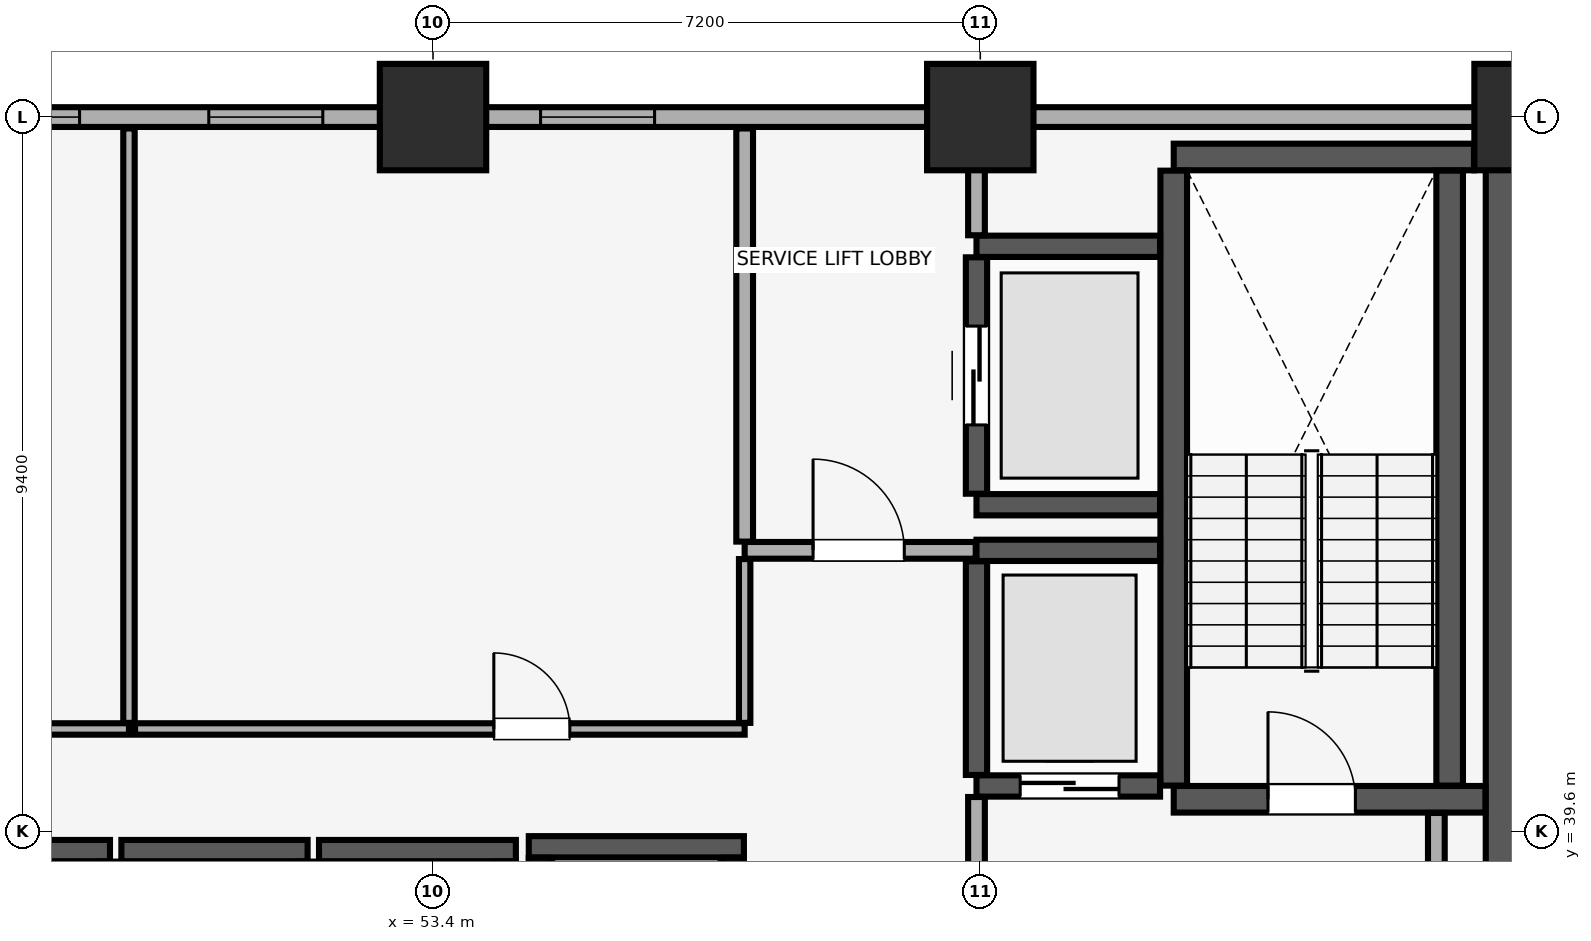
"""IFC4 building model, lengths in metres.
Left out: names, types, materials, properties, quantities, classifications, styles, units other than length and angle.
Written with IfcOpenShell. Run it as: python <this file> out.ifc"""

import sys

from ifc_helpers import new_model, si_unit, direction, frame, frame_2d, origin, origin_2d, place, context, subcontext, project, spatial, rectangle, extrude, element, fill, save


model = new_model("IFC4")
c1 = context("Model", 3, precision=1e-05, world=origin(), true_north=direction((0.0, 1.0)))
c2 = subcontext(c1, "Body", "Model", "MODEL_VIEW")
j1 = project(units=[si_unit("LENGTHUNIT", "METRE"), si_unit("PLANEANGLEUNIT", "RADIAN")], contexts=[c1])
p1 = place(None, origin())
s1 = spatial("IfcSite", under=j1, at=p1, CompositionType="ELEMENT")
p2 = place(p1, origin())
s2 = spatial("IfcBuilding", under=s1, at=p2, CompositionType="ELEMENT")
p3 = place(p2, frame((0.0, 0.0, 57.65)))
s3 = spatial("IfcBuildingStorey", under=s2, at=p3, CompositionType="ELEMENT", Elevation=57.65)
for number, where, z_axis, x_axis in (
    (1, (53.4, 49.0, 0.0), (0.0, 0.0, 1.0), (1.0, 0.0, 0.0)),
    (2, (60.6, 49.0, 0.0), (0.0, 0.0, 1.0), (1.0, 0.0, 0.0)),
    (3, (67.8, 49.0, 0.0), (0.0, 0.0, 1.0), (1.0, 0.0, 0.0)),
):
    element("IfcColumn", number, at=place(p3, frame(where, z_axis=z_axis, x_axis=x_axis)), inside=s3, PredefinedType="COLUMN", context=c2, shape_type="SweptSolid", body=[
        extrude(rectangle(XDim=1.4, YDim=1.4, at=origin_2d()), origin(), (0.0, 0.0, 1.0), 3.51),
    ])
p4 = place(p3, frame((79.8, 49.0, 0.0), z_axis=(0.0, 0.0, 1.0), x_axis=(-1.0, 0.0, 0.0)))
e4 = element("IfcWall", 4, at=p4, inside=s3, PredefinedType="SOLIDWALL", context=c2, shape_type="SweptSolid", body=[
    extrude(rectangle(XDim=75.6, YDim=0.26, at=frame_2d((37.8, 0.0))), origin(), (0.0, 0.0, 1.0), 2.56),
])
p5 = place(p4, frame((72.565, 0.0, 0.85)))
e5 = element("IfcOpeningElement", 5, at=p5, cuts=e4, PredefinedType="OPENING", context=c2, shape_type="SweptSolid", body=[
    extrude(rectangle(XDim=1.5, YDim=1.4, at=frame_2d((0.75, 0.7))), frame((0.0, 0.14, 0.0), z_axis=(0.0, -1.0, 0.0), x_axis=(1.0, 0.0, 0.0)), (0.0, 0.0, 1.0), 0.28),
])
p6 = place(p4, frame((67.45, 0.0, 0.85)))
e6 = element("IfcOpeningElement", 6, at=p6, cuts=e4, PredefinedType="OPENING", context=c2, shape_type="SweptSolid", body=[
    extrude(rectangle(XDim=1.5, YDim=1.4, at=frame_2d((0.75, 0.7))), frame((0.0, 0.14, 0.0), z_axis=(0.0, -1.0, 0.0), x_axis=(1.0, 0.0, 0.0)), (0.0, 0.0, 1.0), 0.28),
])
p7 = place(p4, frame((7.6, 0.0, 0.85)))
e7 = element("IfcOpeningElement", 7, at=p7, cuts=e4, PredefinedType="OPENING", context=c2, shape_type="SweptSolid", body=[
    extrude(rectangle(XDim=1.5, YDim=1.4, at=frame_2d((0.75, 0.7))), frame((0.0, 0.14, 0.0), z_axis=(0.0, -1.0, 0.0), x_axis=(1.0, 0.0, 0.0)), (0.0, 0.0, 1.0), 0.28),
])
p8 = place(p4, frame((1.535, 0.0, 0.85)))
e8 = element("IfcOpeningElement", 8, at=p8, cuts=e4, PredefinedType="OPENING", context=c2, shape_type="SweptSolid", body=[
    extrude(rectangle(XDim=1.5, YDim=1.4, at=frame_2d((0.75, 0.7))), frame((0.0, 0.14, 0.0), z_axis=(0.0, -1.0, 0.0), x_axis=(1.0, 0.0, 0.0)), (0.0, 0.0, 1.0), 0.28),
])
p9 = place(p4, frame((52.265, 0.0, 0.9)))
e9 = element("IfcOpeningElement", 9, at=p9, cuts=e4, PredefinedType="OPENING", context=c2, shape_type="SweptSolid", body=[
    extrude(rectangle(XDim=1.5, YDim=1.4, at=frame_2d((0.75, 0.7))), frame((0.0, 0.14, 0.0), z_axis=(0.0, -1.0, 0.0), x_axis=(1.0, 0.0, 0.0)), (0.0, 0.0, 1.0), 0.28),
])
p10 = place(p4, frame((45.5, 0.0, 0.9)))
e10 = element("IfcOpeningElement", 10, at=p10, cuts=e4, PredefinedType="OPENING", context=c2, shape_type="SweptSolid", body=[
    extrude(rectangle(XDim=1.5, YDim=1.4, at=frame_2d((0.75, 0.7))), frame((0.0, 0.14, 0.0), z_axis=(0.0, -1.0, 0.0), x_axis=(1.0, 0.0, 0.0)), (0.0, 0.0, 1.0), 0.28),
])
p11 = place(p4, frame((31.05, 0.0, 0.9)))
e11 = element("IfcOpeningElement", 11, at=p11, cuts=e4, PredefinedType="OPENING", context=c2, shape_type="SweptSolid", body=[
    extrude(rectangle(XDim=1.5, YDim=1.4, at=frame_2d((0.75, 0.7))), frame((0.0, 0.14, 0.0), z_axis=(0.0, -1.0, 0.0), x_axis=(1.0, 0.0, 0.0)), (0.0, 0.0, 1.0), 0.28),
])
p12 = place(p4, frame((27.85, 0.0, 0.9)))
e12 = element("IfcOpeningElement", 12, at=p12, cuts=e4, PredefinedType="OPENING", context=c2, shape_type="SweptSolid", body=[
    extrude(rectangle(XDim=1.5, YDim=1.4, at=frame_2d((0.75, 0.7))), frame((0.0, 0.14, 0.0), z_axis=(0.0, -1.0, 0.0), x_axis=(1.0, 0.0, 0.0)), (0.0, 0.0, 1.0), 0.28),
])
p13 = place(p4, frame((23.485, 0.0, 0.9)))
e13 = element("IfcOpeningElement", 13, at=p13, cuts=e4, PredefinedType="OPENING", context=c2, shape_type="SweptSolid", body=[
    extrude(rectangle(XDim=1.5, YDim=1.4, at=frame_2d((0.75, 0.7))), frame((0.0, 0.14, 0.0), z_axis=(0.0, -1.0, 0.0), x_axis=(1.0, 0.0, 0.0)), (0.0, 0.0, 1.0), 0.28),
])
p14 = place(p3, frame((67.8, 29.4, 0.0), z_axis=(0.0, 0.0, 1.0), x_axis=(0.0, 1.0, 0.0)))
e14 = element("IfcWall", 14, at=p14, inside=s3, PredefinedType="SHEAR", context=c2, shape_type="SweptSolid", body=[
    extrude(rectangle(XDim=19.2, YDim=1.1, at=frame_2d((9.6, 0.0))), origin(), (0.0, 0.0, 1.0), 3.51),
])
p15 = place(p3, frame((63.145, 40.025, 0.0), z_axis=(0.0, 0.0, 1.0), x_axis=(1.0, 0.0, 0.0)))
e15 = element("IfcWall", 15, at=p15, inside=s3, PredefinedType="SHEAR", context=c2, shape_type="SweptSolid", body=[
    extrude(rectangle(XDim=4.1, YDim=0.35, at=frame_2d((2.05, 0.0))), origin(), (0.0, 0.0, 1.0), 3.51),
])
p16 = place(p15, frame((1.24, 0.0, 0.0)))
e16 = element("IfcOpeningElement", 16, at=p16, cuts=e15, PredefinedType="OPENING", context=c2, shape_type="SweptSolid", body=[
    extrude(rectangle(XDim=1.15, YDim=2.15, at=frame_2d((0.575, 1.075))), frame((0.0, 0.185, 0.0), z_axis=(0.0, -1.0, 0.0), x_axis=(1.0, 0.0, 0.0)), (0.0, 0.0, 1.0), 0.37),
])
p17 = place(p3, frame((63.145, 48.475, 0.0), z_axis=(0.0, 0.0, 1.0), x_axis=(1.0, 0.0, 0.0)))
e17 = element("IfcWall", 17, at=p17, inside=s3, PredefinedType="SHEAR", context=c2, shape_type="SweptSolid", body=[
    extrude(rectangle(XDim=3.95, YDim=0.35, at=frame_2d((1.975, 0.0))), origin(), (0.0, 0.0, 1.0), 3.51),
])
for number, where, z_axis, x_axis in (
    (18, (63.145, 40.205, 0.0), (0.0, 0.0, 1.0), (0.0, 1.0, 0.0)),
    (19, (66.775, 40.205, 0.0), (0.0, 0.0, 1.0), (0.0, 1.0, 0.0)),
):
    element("IfcWall", number, at=place(p3, frame(where, z_axis=z_axis, x_axis=x_axis)), inside=s3, PredefinedType="SHEAR", context=c2, shape_type="SweptSolid", body=[
        extrude(rectangle(XDim=8.09, YDim=0.35, at=frame_2d((4.045, 0.0))), origin(), (0.0, 0.0, 1.0), 3.51),
    ])
p18 = place(p3, frame((46.7, 39.35, 0.0), z_axis=(0.0, 0.0, 1.0), x_axis=(1.0, 0.0, 0.0)))
e20 = element("IfcWall", 20, at=p18, inside=s3, PredefinedType="SHEAR", context=c2, shape_type="SweptSolid", body=[
    extrude(rectangle(XDim=2.45, YDim=0.28, at=frame_2d((1.225, 0.0))), origin(), (0.0, 0.0, 1.0), 3.51),
])
p19 = place(p3, frame((49.15, 37.145, 0.0), z_axis=(0.0, 0.0, 1.0), x_axis=(0.0, 1.0, 0.0)))
e21 = element("IfcWall", 21, at=p19, inside=s3, PredefinedType="SHEAR", context=c2, shape_type="SweptSolid", body=[
    extrude(rectangle(XDim=2.06, YDim=0.28, at=frame_2d((1.03, 0.0))), origin(), (0.0, 0.0, 1.0), 3.51),
])
p20 = place(p3, frame((49.3, 39.35, 0.0), z_axis=(0.0, 0.0, 1.0), x_axis=(1.0, 0.0, 0.0)))
e22 = element("IfcWall", 22, at=p20, inside=s3, PredefinedType="SHEAR", context=c2, shape_type="SweptSolid", body=[
    extrude(rectangle(XDim=2.45, YDim=0.28, at=frame_2d((1.225, 0.0))), origin(), (0.0, 0.0, 1.0), 3.51),
])
p21 = place(p3, frame((51.75, 37.145, 0.0), z_axis=(0.0, 0.0, 1.0), x_axis=(0.0, 1.0, 0.0)))
e23 = element("IfcWall", 23, at=p21, inside=s3, PredefinedType="SHEAR", context=c2, shape_type="SweptSolid", body=[
    extrude(rectangle(XDim=2.06, YDim=0.28, at=frame_2d((1.03, 0.0))), origin(), (0.0, 0.0, 1.0), 3.51),
])
p22 = place(p3, frame((51.9, 39.35, 0.0), z_axis=(0.0, 0.0, 1.0), x_axis=(1.0, 0.0, 0.0)))
e24 = element("IfcWall", 24, at=p22, inside=s3, PredefinedType="SHEAR", context=c2, shape_type="SweptSolid", body=[
    extrude(rectangle(XDim=2.59, YDim=0.28, at=frame_2d((1.295, 0.0))), origin(), (0.0, 0.0, 1.0), 3.51),
])
p23 = place(p3, frame((54.35, 37.145, 0.0), z_axis=(0.0, 0.0, 1.0), x_axis=(0.0, 1.0, 0.0)))
e25 = element("IfcWall", 25, at=p23, inside=s3, PredefinedType="SHEAR", context=c2, shape_type="SweptSolid", body=[
    extrude(rectangle(XDim=2.06, YDim=0.28, at=frame_2d((1.03, 0.0))), origin(), (0.0, 0.0, 1.0), 3.51),
])
p24 = place(p3, frame((54.66, 39.4, 0.0), z_axis=(0.0, 0.0, 1.0), x_axis=(1.0, 0.0, 0.0)))
e26 = element("IfcWall", 26, at=p24, inside=s3, PredefinedType="SHEAR", context=c2, shape_type="SweptSolid", body=[
    extrude(rectangle(XDim=2.83, YDim=0.28, at=frame_2d((1.415, 0.0))), origin(), (0.0, 0.0, 1.0), 3.51),
])
for number, where, z_axis, x_axis in (
    (27, (54.8, 37.145, 0.0), (0.0, 0.0, 1.0), (0.0, 1.0, 0.0)),
    (28, (57.35, 37.145, 0.0), (0.0, 0.0, 1.0), (0.0, 1.0, 0.0)),
):
    element("IfcWall", number, at=place(p3, frame(where, z_axis=z_axis, x_axis=x_axis)), inside=s3, PredefinedType="SHEAR", context=c2, shape_type="SweptSolid", body=[
        extrude(rectangle(XDim=2.11, YDim=0.28, at=frame_2d((1.055, 0.0))), origin(), (0.0, 0.0, 1.0), 3.51),
    ])
p25 = place(p3, frame((60.55, 40.2, 0.0), z_axis=(0.0, 0.0, 1.0), x_axis=(1.0, 0.0, 0.0)))
e29 = element("IfcWall", 29, at=p25, inside=s3, PredefinedType="SHEAR", context=c2, shape_type="SweptSolid", body=[
    extrude(rectangle(XDim=2.415, YDim=0.28, at=frame_2d((1.208, 0.0))), origin(), (0.0, 0.0, 1.0), 3.51),
])
p26 = place(p25, frame((0.575, 0.0, 0.0)))
e30 = element("IfcOpeningElement", 30, at=p26, cuts=e29, PredefinedType="OPENING", context=c2, shape_type="SweptSolid", body=[
    extrude(rectangle(XDim=1.3, YDim=2.3, at=frame_2d((0.65, 1.15))), frame((0.0, 0.15, 0.0), z_axis=(0.0, -1.0, 0.0), x_axis=(1.0, 0.0, 0.0)), (0.0, 0.0, 1.0), 0.3),
])
p27 = place(p3, frame((60.55, 43.3, 0.0), z_axis=(0.0, 0.0, 1.0), x_axis=(1.0, 0.0, 0.0)))
e31 = element("IfcWall", 31, at=p27, inside=s3, PredefinedType="SHEAR", context=c2, shape_type="SweptSolid", body=[
    extrude(rectangle(XDim=2.415, YDim=0.28, at=frame_2d((1.208, 0.0))), origin(), (0.0, 0.0, 1.0), 3.51),
])
p28 = place(p3, frame((60.55, 40.345, 0.0), z_axis=(0.0, 0.0, 1.0), x_axis=(0.0, 1.0, 0.0)))
e32 = element("IfcWall", 32, at=p28, inside=s3, PredefinedType="SHEAR", context=c2, shape_type="SweptSolid", body=[
    extrude(rectangle(XDim=2.81, YDim=0.28, at=frame_2d((1.405, 0.0))), origin(), (0.0, 0.0, 1.0), 3.51),
])
for number, where, z_axis, x_axis in (
    (33, (60.55, 43.9, 0.0), (0.0, 0.0, 1.0), (1.0, 0.0, 0.0)),
    (34, (60.55, 47.3, 0.0), (0.0, 0.0, 1.0), (1.0, 0.0, 0.0)),
):
    element("IfcWall", number, at=place(p3, frame(where, z_axis=z_axis, x_axis=x_axis)), inside=s3, PredefinedType="SHEAR", context=c2, shape_type="SweptSolid", body=[
        extrude(rectangle(XDim=2.415, YDim=0.28, at=frame_2d((1.208, 0.0))), origin(), (0.0, 0.0, 1.0), 3.51),
    ])
p29 = place(p3, frame((60.55, 44.045, 0.0), z_axis=(0.0, 0.0, 1.0), x_axis=(0.0, 1.0, 0.0)))
e35 = element("IfcWall", 35, at=p29, inside=s3, PredefinedType="SHEAR", context=c2, shape_type="SweptSolid", body=[
    extrude(rectangle(XDim=3.11, YDim=0.28, at=frame_2d((1.555, 0.0))), origin(), (0.0, 0.0, 1.0), 3.51),
])
p30 = place(p29, frame((0.905, 0.0, 0.0)))
e36 = element("IfcOpeningElement", 36, at=p30, cuts=e35, PredefinedType="OPENING", context=c2, shape_type="SweptSolid", body=[
    extrude(rectangle(XDim=1.3, YDim=2.3, at=frame_2d((0.65, 1.15))), frame((0.0, 0.15, 0.0), z_axis=(0.0, -1.0, 0.0), x_axis=(1.0, 0.0, 0.0)), (0.0, 0.0, 1.0), 0.3),
])
p31 = place(p3, frame((60.55, 34.415, 0.0), z_axis=(0.0, 0.0, 1.0), x_axis=(0.0, 1.0, 0.0)))
e37 = element("IfcWall", 37, at=p31, inside=s3, PredefinedType="PARTITIONING", context=c2, shape_type="SweptSolid", body=[
    extrude(rectangle(XDim=5.64, YDim=0.22, at=frame_2d((2.82, 0.0))), origin(), (0.0, 0.0, 1.0), 3.51),
])
p32 = place(p3, frame((66.6, 34.415, 0.0), z_axis=(0.0, 0.0, 1.0), x_axis=(0.0, 1.0, 0.0)))
e38 = element("IfcWall", 38, at=p32, inside=s3, PredefinedType="PARTITIONING", context=c2, shape_type="SweptSolid", body=[
    extrude(rectangle(XDim=5.43, YDim=0.22, at=frame_2d((2.715, 0.0))), origin(), (0.0, 0.0, 1.0), 3.51),
])
p33 = place(p3, frame((57.5, 43.3, 0.0), z_axis=(0.0, 0.0, 1.0), x_axis=(1.0, 0.0, 0.0)))
e39 = element("IfcWall", 39, at=p33, inside=s3, PredefinedType="PARTITIONING", context=c2, shape_type="SweptSolid", body=[
    extrude(rectangle(XDim=3.04, YDim=0.22, at=frame_2d((1.52, 0.0))), origin(), (0.0, 0.0, 1.0), 3.51),
])
p34 = place(p33, frame((0.9, 0.0, 0.0)))
e40 = element("IfcOpeningElement", 40, at=p34, cuts=e39, PredefinedType="OPENING", context=c2, shape_type="SweptSolid", body=[
    extrude(rectangle(XDim=1.2, YDim=2.15, at=frame_2d((0.6, 1.075))), frame((0.0, 0.12, 0.0), z_axis=(0.0, -1.0, 0.0), x_axis=(1.0, 0.0, 0.0)), (0.0, 0.0, 1.0), 0.24),
])
p35 = place(p3, frame((57.5, 43.415, 0.0), z_axis=(0.0, 0.0, 1.0), x_axis=(0.0, 1.0, 0.0)))
e41 = element("IfcWall", 41, at=p35, inside=s3, PredefinedType="PARTITIONING", context=c2, shape_type="SweptSolid", body=[
    extrude(rectangle(XDim=5.435, YDim=0.22, at=frame_2d((2.718, 0.0))), origin(), (0.0, 0.0, 1.0), 3.51),
])
p36 = place(p3, frame((60.55, 47.445, 0.0), z_axis=(0.0, 0.0, 1.0), x_axis=(0.0, 1.0, 0.0)))
e42 = element("IfcWall", 42, at=p36, inside=s3, PredefinedType="PARTITIONING", context=c2, shape_type="SweptSolid", body=[
    extrude(rectangle(XDim=1.405, YDim=0.22, at=frame_2d((0.703, 0.0))), origin(), (0.0, 0.0, 1.0), 3.51),
])
p37 = place(p3, frame((44.3, 40.95, 0.0), z_axis=(0.0, 0.0, 1.0), x_axis=(1.0, 0.0, 0.0)))
e43 = element("IfcWall", 43, at=p37, inside=s3, PredefinedType="PARTITIONING", context=c2, shape_type="SweptSolid", body=[
    extrude(rectangle(XDim=5.1, YDim=0.15, at=frame_2d((2.55, 0.0))), origin(), (0.0, 0.0, 1.0), 3.51),
])
p38 = place(p37, frame((2.875, 0.0, 0.0)))
e44 = element("IfcOpeningElement", 44, at=p38, cuts=e43, PredefinedType="OPENING", context=c2, shape_type="SweptSolid", body=[
    extrude(rectangle(XDim=0.85, YDim=2.1, at=frame_2d((0.425, 1.05))), frame((0.0, 0.085, 0.0), z_axis=(0.0, -1.0, 0.0), x_axis=(1.0, 0.0, 0.0)), (0.0, 0.0, 1.0), 0.17),
])
p39 = place(p3, frame((49.4, 41.03, 0.0), z_axis=(0.0, 0.0, 1.0), x_axis=(0.0, 1.0, 0.0)))
e45 = element("IfcWall", 45, at=p39, inside=s3, PredefinedType="PARTITIONING", context=c2, shape_type="SweptSolid", body=[
    extrude(rectangle(XDim=7.82, YDim=0.15, at=frame_2d((3.91, 0.0))), origin(), (0.0, 0.0, 1.0), 3.51),
])
p40 = place(p3, frame((49.48, 40.95, 0.0), z_axis=(0.0, 0.0, 1.0), x_axis=(1.0, 0.0, 0.0)))
e46 = element("IfcWall", 46, at=p40, inside=s3, PredefinedType="PARTITIONING", context=c2, shape_type="SweptSolid", body=[
    extrude(rectangle(XDim=8.02, YDim=0.15, at=frame_2d((4.01, 0.0))), origin(), (0.0, 0.0, 1.0), 3.51),
])
p41 = place(p40, frame((4.72, 0.0, 0.0)))
e47 = element("IfcOpeningElement", 47, at=p41, cuts=e46, PredefinedType="OPENING", context=c2, shape_type="SweptSolid", body=[
    extrude(rectangle(XDim=1.0, YDim=2.15, at=frame_2d((0.5, 1.075))), frame((0.0, 0.085, 0.0), z_axis=(0.0, -1.0, 0.0), x_axis=(1.0, 0.0, 0.0)), (0.0, 0.0, 1.0), 0.17),
])
p42 = place(p3, frame((57.5, 41.03, 0.0), z_axis=(0.0, 0.0, 1.0), x_axis=(0.0, 1.0, 0.0)))
e48 = element("IfcWall", 48, at=p42, inside=s3, PredefinedType="PARTITIONING", context=c2, shape_type="SweptSolid", body=[
    extrude(rectangle(XDim=2.155, YDim=0.15, at=frame_2d((1.078, 0.0))), origin(), (0.0, 0.0, 1.0), 3.51),
])
p43 = place(p11, origin())
e49 = element("IfcWindow", 49, at=p43, inside=s3, PartitioningType="SINGLE_PANEL", PredefinedType="WINDOW", context=c2, shape_type="SweptSolid", body=[
    extrude(rectangle(XDim=1.5, YDim=1.4, at=frame_2d((0.75, 0.7))), frame((0.0, 0.03, 0.0), z_axis=(0.0, -1.0, 0.0), x_axis=(1.0, 0.0, 0.0)), (0.0, 0.0, 1.0), 0.06),
])
fill(e11, e49)
p44 = place(p12, origin())
e50 = element("IfcWindow", 50, at=p44, inside=s3, PartitioningType="SINGLE_PANEL", PredefinedType="WINDOW", context=c2, shape_type="SweptSolid", body=[
    extrude(rectangle(XDim=1.5, YDim=1.4, at=frame_2d((0.75, 0.7))), frame((0.0, 0.03, 0.0), z_axis=(0.0, -1.0, 0.0), x_axis=(1.0, 0.0, 0.0)), (0.0, 0.0, 1.0), 0.06),
])
fill(e12, e50)
p45 = place(p13, origin())
e51 = element("IfcWindow", 51, at=p45, inside=s3, PartitioningType="SINGLE_PANEL", PredefinedType="WINDOW", context=c2, shape_type="SweptSolid", body=[
    extrude(rectangle(XDim=1.5, YDim=1.4, at=frame_2d((0.75, 0.7))), frame((0.0, 0.03, 0.0), z_axis=(0.0, -1.0, 0.0), x_axis=(1.0, 0.0, 0.0)), (0.0, 0.0, 1.0), 0.06),
])
fill(e13, e51)
p46 = place(p16, origin())
e52 = element("IfcDoor", 52, at=p46, inside=s3, OperationType="SINGLE_SWING_LEFT", PredefinedType="DOOR", context=c2, shape_type="SweptSolid", body=[
    extrude(rectangle(XDim=1.15, YDim=2.15, at=frame_2d((0.575, 1.075))), frame((0.0, 0.025, 0.0), z_axis=(0.0, -1.0, 0.0), x_axis=(1.0, 0.0, 0.0)), (0.0, 0.0, 1.0), 0.05),
])
fill(e16, e52)
p47 = place(p26, origin())
e53 = element("IfcDoor", 53, at=p47, inside=s3, OperationType="DOUBLE_DOOR_SLIDING", PredefinedType="DOOR", context=c2, shape_type="SweptSolid", body=[
    extrude(rectangle(XDim=1.3, YDim=2.3, at=frame_2d((0.65, 1.15))), frame((0.0, 0.025, 0.0), z_axis=(0.0, -1.0, 0.0), x_axis=(1.0, 0.0, 0.0)), (0.0, 0.0, 1.0), 0.05),
])
fill(e30, e53)
p48 = place(p30, origin())
e54 = element("IfcDoor", 54, at=p48, inside=s3, OperationType="DOUBLE_DOOR_SLIDING", PredefinedType="DOOR", context=c2, shape_type="SweptSolid", body=[
    extrude(rectangle(XDim=1.3, YDim=2.3, at=frame_2d((0.65, 1.15))), frame((0.0, 0.025, 0.0), z_axis=(0.0, -1.0, 0.0), x_axis=(1.0, 0.0, 0.0)), (0.0, 0.0, 1.0), 0.05),
])
fill(e36, e54)
p49 = place(p34, origin())
e55 = element("IfcDoor", 55, at=p49, inside=s3, OperationType="SINGLE_SWING_LEFT", PredefinedType="DOOR", context=c2, shape_type="SweptSolid", body=[
    extrude(rectangle(XDim=1.2, YDim=2.15, at=frame_2d((0.6, 1.075))), frame((0.0, 0.025, 0.0), z_axis=(0.0, -1.0, 0.0), x_axis=(1.0, 0.0, 0.0)), (0.0, 0.0, 1.0), 0.05),
])
fill(e40, e55)
p50 = place(p41, origin())
e56 = element("IfcDoor", 56, at=p50, inside=s3, OperationType="SINGLE_SWING_LEFT", PredefinedType="DOOR", context=c2, shape_type="SweptSolid", body=[
    extrude(rectangle(XDim=1.0, YDim=2.15, at=frame_2d((0.5, 1.075))), frame((0.0, 0.025, 0.0), z_axis=(0.0, -1.0, 0.0), x_axis=(1.0, 0.0, 0.0)), (0.0, 0.0, 1.0), 0.05),
])
fill(e47, e56)
save(model, sys.argv[1])
